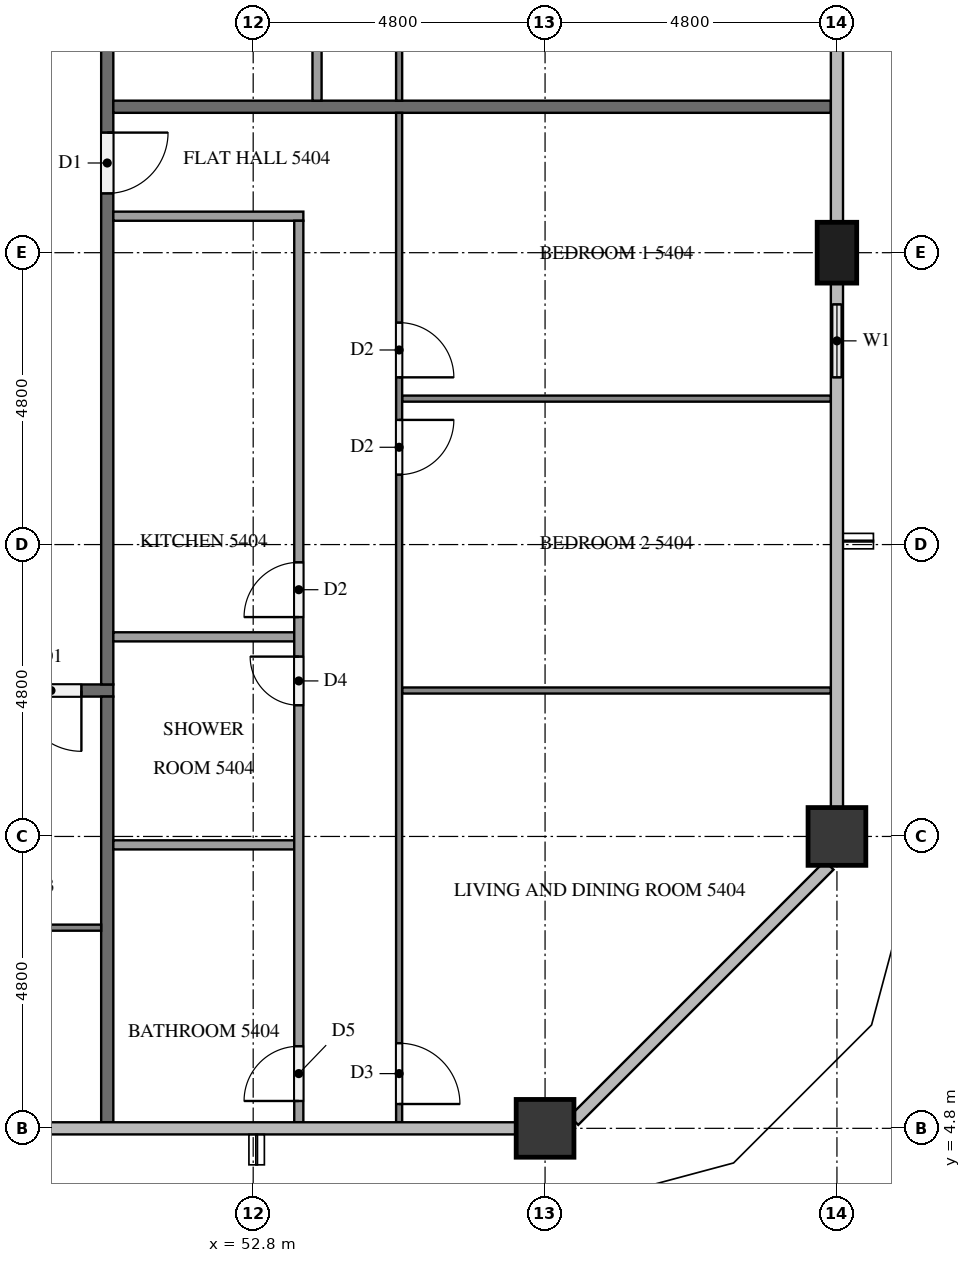
"""IFC4 building model, lengths in metres.
Left out: names, types, materials, properties, quantities, classifications, styles, units other than length and angle.
Written with IfcOpenShell. Run it as: python <this file> out.ifc"""

import sys

from ifc_helpers import new_model, si_unit, direction, frame, frame_2d, origin, origin_2d, place, context, subcontext, project, spatial, rectangle, extrude, element, fill, save


model = new_model("IFC4")
c1 = context("Model", 3, precision=1e-05, world=origin(), true_north=direction((0.0, 1.0)))
c2 = subcontext(c1, "Body", "Model", "MODEL_VIEW")
j1 = project(units=[si_unit("LENGTHUNIT", "METRE"), si_unit("PLANEANGLEUNIT", "RADIAN")], contexts=[c1])
p1 = place(None, origin())
s1 = spatial("IfcSite", under=j1, at=p1, CompositionType="ELEMENT")
p2 = place(p1, origin())
s2 = spatial("IfcBuilding", under=s1, at=p2, CompositionType="ELEMENT")
p3 = place(p2, frame((0.0, 0.0, 208.8)))
s3 = spatial("IfcBuildingStorey", under=s2, at=p3, CompositionType="ELEMENT", Elevation=208.8)
for number, where, z_axis, x_axis in (
    (1, (57.6, 4.8, 0.0), (0.0, 0.0, 1.0), (1.0, 0.0, 0.0)),
    (2, (62.4, 9.6, 0.0), (0.0, 0.0, 1.0), (1.0, 0.0, 0.0)),
):
    element("IfcColumn", number, at=place(p3, frame(where, z_axis=z_axis, x_axis=x_axis)), inside=s3, PredefinedType="COLUMN", context=c2, shape_type="SweptSolid", body=[
        extrude(rectangle(XDim=0.95, YDim=0.95, at=origin_2d()), origin(), (0.0, 0.0, 1.0), 3.2),
    ])
p4 = place(p3, frame((62.4, 19.2, 0.0), z_axis=(0.0, 0.0, 1.0), x_axis=(0.0, 1.0, 0.0)))
e3 = element("IfcColumn", 3, at=p4, inside=s3, PredefinedType="COLUMN", context=c2, shape_type="SweptSolid", body=[
    extrude(rectangle(XDim=1.0, YDim=0.65, at=origin_2d()), origin(), (0.0, 0.0, 1.0), 3.2),
])
p5 = place(p3, frame((62.4, 16.8, 0.0), z_axis=(0.0, 0.0, 1.0), x_axis=(0.0, 1.0, 0.0)))
e4 = element("IfcWall", 4, at=p5, inside=s3, PredefinedType="SOLIDWALL", context=c2, shape_type="SweptSolid", body=[
    extrude(rectangle(XDim=1.9, YDim=0.15, at=frame_2d((0.95, 0.0))), origin(), (0.0, 0.0, 1.0), 3.2),
])
p6 = place(p5, frame((0.35, 0.0, 0.9)))
e5 = element("IfcOpeningElement", 5, at=p6, cuts=e4, PredefinedType="OPENING", context=c2, shape_type="SweptSolid", body=[
    extrude(rectangle(XDim=1.2, YDim=1.4, at=frame_2d((0.6, 0.7))), frame((0.0, 0.085, 0.0), z_axis=(0.0, -1.0, 0.0), x_axis=(1.0, 0.0, 0.0)), (0.0, 0.0, 1.0), 0.17),
])
p7 = place(p3, frame((50.5, 12.0, 0.0), z_axis=(0.0, 0.0, 1.0), x_axis=(-1.0, 0.0, 0.0)))
e6 = element("IfcWall", 6, at=p7, inside=s3, PredefinedType="PARTITIONING", context=c2, shape_type="SweptSolid", body=[
    extrude(rectangle(XDim=38.6, YDim=0.2, at=frame_2d((19.3, 0.0))), origin(), (0.0, 0.0, 1.0), 3.2),
])
p8 = place(p7, frame((37.075, 0.0, 0.0)))
e7 = element("IfcOpeningElement", 7, at=p8, cuts=e6, PredefinedType="OPENING", context=c2, shape_type="SweptSolid", body=[
    extrude(rectangle(XDim=1.0, YDim=2.1, at=frame_2d((0.5, 1.05))), frame((0.0, 0.11, 0.0), z_axis=(0.0, -1.0, 0.0), x_axis=(1.0, 0.0, 0.0)), (0.0, 0.0, 1.0), 0.22),
])
p9 = place(p7, frame((20.275, 0.0, 0.0)))
e8 = element("IfcOpeningElement", 8, at=p9, cuts=e6, PredefinedType="OPENING", context=c2, shape_type="SweptSolid", body=[
    extrude(rectangle(XDim=1.0, YDim=2.1, at=frame_2d((0.5, 1.05))), frame((0.0, 0.11, 0.0), z_axis=(0.0, -1.0, 0.0), x_axis=(1.0, 0.0, 0.0)), (0.0, 0.0, 1.0), 0.22),
])
p10 = place(p7, frame((0.525, 0.0, 0.0)))
e9 = element("IfcOpeningElement", 9, at=p10, cuts=e6, PredefinedType="OPENING", context=c2, shape_type="SweptSolid", body=[
    extrude(rectangle(XDim=1.0, YDim=2.1, at=frame_2d((0.5, 1.05))), frame((0.0, 0.11, 0.0), z_axis=(0.0, -1.0, 0.0), x_axis=(1.0, 0.0, 0.0)), (0.0, 0.0, 1.0), 0.22),
])
p11 = place(p3, frame((50.4, 40.7, 0.0), z_axis=(0.0, 0.0, 1.0), x_axis=(0.0, -1.0, 0.0)))
e10 = element("IfcWall", 10, at=p11, inside=s3, PredefinedType="PARTITIONING", context=c2, shape_type="SweptSolid", body=[
    extrude(rectangle(XDim=28.6, YDim=0.2, at=frame_2d((14.3, 0.0))), origin(), (0.0, 0.0, 1.0), 3.2),
])
p12 = place(p11, frame((19.525, 0.0, 0.0)))
e11 = element("IfcOpeningElement", 11, at=p12, cuts=e10, PredefinedType="OPENING", context=c2, shape_type="SweptSolid", body=[
    extrude(rectangle(XDim=1.0, YDim=2.1, at=frame_2d((0.5, 1.05))), frame((0.0, 0.11, 0.0), z_axis=(0.0, -1.0, 0.0), x_axis=(1.0, 0.0, 0.0)), (0.0, 0.0, 1.0), 0.22),
])
p13 = place(p11, frame((7.525, 0.0, 0.0)))
e12 = element("IfcOpeningElement", 12, at=p13, cuts=e10, PredefinedType="OPENING", context=c2, shape_type="SweptSolid", body=[
    extrude(rectangle(XDim=1.0, YDim=2.1, at=frame_2d((0.5, 1.05))), frame((0.0, 0.11, 0.0), z_axis=(0.0, -1.0, 0.0), x_axis=(1.0, 0.0, 0.0)), (0.0, 0.0, 1.0), 0.22),
])
p14 = place(p11, frame((0.325, 0.0, 0.0)))
e13 = element("IfcOpeningElement", 13, at=p14, cuts=e10, PredefinedType="OPENING", context=c2, shape_type="SweptSolid", body=[
    extrude(rectangle(XDim=1.0, YDim=2.1, at=frame_2d((0.5, 1.05))), frame((0.0, 0.11, 0.0), z_axis=(0.0, -1.0, 0.0), x_axis=(1.0, 0.0, 0.0)), (0.0, 0.0, 1.0), 0.22),
])
p15 = place(p3, frame((50.4, 11.9, 0.0), z_axis=(0.0, 0.0, 1.0), x_axis=(0.0, -1.0, 0.0)))
e14 = element("IfcWall", 14, at=p15, inside=s3, PredefinedType="PARTITIONING", context=c2, shape_type="SweptSolid", body=[
    extrude(rectangle(XDim=7.0, YDim=0.2, at=frame_2d((3.5, 0.0))), origin(), (0.0, 0.0, 1.0), 3.2),
])
p16 = place(p3, frame((50.5, 21.6, 0.0), z_axis=(0.0, 0.0, 1.0), x_axis=(1.0, 0.0, 0.0)))
e15 = element("IfcWall", 15, at=p16, inside=s3, PredefinedType="PARTITIONING", context=c2, shape_type="SweptSolid", body=[
    extrude(rectangle(XDim=11.8, YDim=0.2, at=frame_2d((5.9, 0.0))), origin(), (0.0, 0.0, 1.0), 3.2),
])
p17 = place(p3, frame((50.3, 8.1, 0.0), z_axis=(0.0, 0.0, 1.0), x_axis=(-1.0, 0.0, 0.0)))
e16 = element("IfcWall", 16, at=p17, inside=s3, PredefinedType="PARTITIONING", context=c2, shape_type="SweptSolid", body=[
    extrude(rectangle(XDim=9.4, YDim=0.1, at=frame_2d((4.7, 0.0))), origin(), (0.0, 0.0, 1.0), 3.2),
])
p18 = place(p17, frame((3.35, 0.0, 0.0)))
e17 = element("IfcOpeningElement", 17, at=p18, cuts=e16, PredefinedType="OPENING", context=c2, shape_type="SweptSolid", body=[
    extrude(rectangle(XDim=1.0, YDim=2.1, at=frame_2d((0.5, 1.05))), frame((0.0, 0.06, 0.0), z_axis=(0.0, -1.0, 0.0), x_axis=(1.0, 0.0, 0.0)), (0.0, 0.0, 1.0), 0.12),
])
p19 = place(p17, frame((5.05, 0.0, 0.0)))
e18 = element("IfcOpeningElement", 18, at=p19, cuts=e16, PredefinedType="OPENING", context=c2, shape_type="SweptSolid", body=[
    extrude(rectangle(XDim=0.9, YDim=2.1, at=frame_2d((0.45, 1.05))), frame((0.0, 0.06, 0.0), z_axis=(0.0, -1.0, 0.0), x_axis=(1.0, 0.0, 0.0)), (0.0, 0.0, 1.0), 0.12),
])
for number, where, z_axis, x_axis in (
    (19, (55.25, 16.8, 0.0), (0.0, 0.0, 1.0), (1.0, 0.0, 0.0)),
    (20, (55.25, 12.0, 0.0), (0.0, 0.0, 1.0), (1.0, 0.0, 0.0)),
):
    element("IfcWall", number, at=place(p3, frame(where, z_axis=z_axis, x_axis=x_axis)), inside=s3, PredefinedType="PARTITIONING", context=c2, shape_type="SweptSolid", body=[
        extrude(rectangle(XDim=7.05, YDim=0.1, at=frame_2d((3.525, 0.0))), origin(), (0.0, 0.0, 1.0), 3.2),
    ])
p20 = place(p3, frame((55.2, 21.5, 0.0), z_axis=(0.0, 0.0, 1.0), x_axis=(0.0, -1.0, 0.0)))
e21 = element("IfcWall", 21, at=p20, inside=s3, PredefinedType="PARTITIONING", context=c2, shape_type="SweptSolid", body=[
    extrude(rectangle(XDim=16.6, YDim=0.1, at=frame_2d((8.3, 0.0))), origin(), (0.0, 0.0, 1.0), 3.2),
])
p21 = place(p20, frame((3.45, 0.0, 0.0)))
e22 = element("IfcOpeningElement", 22, at=p21, cuts=e21, PredefinedType="OPENING", context=c2, shape_type="SweptSolid", body=[
    extrude(rectangle(XDim=0.9, YDim=2.1, at=frame_2d((0.45, 1.05))), frame((0.0, 0.06, 0.0), z_axis=(0.0, -1.0, 0.0), x_axis=(1.0, 0.0, 0.0)), (0.0, 0.0, 1.0), 0.12),
])
p22 = place(p20, frame((5.05, 0.0, 0.0)))
e23 = element("IfcOpeningElement", 23, at=p22, cuts=e21, PredefinedType="OPENING", context=c2, shape_type="SweptSolid", body=[
    extrude(rectangle(XDim=0.9, YDim=2.1, at=frame_2d((0.45, 1.05))), frame((0.0, 0.06, 0.0), z_axis=(0.0, -1.0, 0.0), x_axis=(1.0, 0.0, 0.0)), (0.0, 0.0, 1.0), 0.12),
])
p23 = place(p20, frame((15.3, 0.0, 0.0)))
e24 = element("IfcOpeningElement", 24, at=p23, cuts=e21, PredefinedType="OPENING", context=c2, shape_type="SweptSolid", body=[
    extrude(rectangle(XDim=1.0, YDim=2.1, at=frame_2d((0.5, 1.05))), frame((0.0, 0.06, 0.0), z_axis=(0.0, -1.0, 0.0), x_axis=(1.0, 0.0, 0.0)), (0.0, 0.0, 1.0), 0.12),
])
for number, where, z_axis, x_axis in (
    (25, (50.5, 12.883, 0.0), (0.0, 0.0, 1.0), (1.0, 0.0, 0.0)),
    (26, (50.5, 9.461, 0.0), (0.0, 0.0, 1.0), (1.0, 0.0, 0.0)),
):
    element("IfcWall", number, at=place(p3, frame(where, z_axis=z_axis, x_axis=x_axis)), inside=s3, PredefinedType="PARTITIONING", context=c2, shape_type="SweptSolid", body=[
        extrude(rectangle(XDim=2.975, YDim=0.15, at=frame_2d((1.488, 0.0))), origin(), (0.0, 0.0, 1.0), 3.2),
    ])
p24 = place(p3, frame((50.5, 19.8, 0.0), z_axis=(0.0, 0.0, 1.0), x_axis=(1.0, 0.0, 0.0)))
e27 = element("IfcWall", 27, at=p24, inside=s3, PredefinedType="PARTITIONING", context=c2, shape_type="SweptSolid", body=[
    extrude(rectangle(XDim=3.125, YDim=0.15, at=frame_2d((1.562, 0.0))), origin(), (0.0, 0.0, 1.0), 3.2),
])
p25 = place(p3, frame((53.55, 4.9, 0.0), z_axis=(0.0, 0.0, 1.0), x_axis=(0.0, 1.0, 0.0)))
e28 = element("IfcWall", 28, at=p25, inside=s3, PredefinedType="PARTITIONING", context=c2, shape_type="SweptSolid", body=[
    extrude(rectangle(XDim=14.825, YDim=0.15, at=frame_2d((7.413, 0.0))), origin(), (0.0, 0.0, 1.0), 3.2),
])
p26 = place(p25, frame((8.308, 0.0, 0.0)))
e29 = element("IfcOpeningElement", 29, at=p26, cuts=e28, PredefinedType="OPENING", context=c2, shape_type="SweptSolid", body=[
    extrude(rectangle(XDim=0.9, YDim=2.1, at=frame_2d((0.45, 1.05))), frame((0.0, 0.085, 0.0), z_axis=(0.0, -1.0, 0.0), x_axis=(1.0, 0.0, 0.0)), (0.0, 0.0, 1.0), 0.17),
])
p27 = place(p25, frame((6.858, 0.0, 0.0)))
e30 = element("IfcOpeningElement", 30, at=p27, cuts=e28, PredefinedType="OPENING", context=c2, shape_type="SweptSolid", body=[
    extrude(rectangle(XDim=0.8, YDim=2.1, at=frame_2d((0.4, 1.05))), frame((0.0, 0.085, 0.0), z_axis=(0.0, -1.0, 0.0), x_axis=(1.0, 0.0, 0.0)), (0.0, 0.0, 1.0), 0.17),
])
p28 = place(p25, frame((0.35, 0.0, 0.0)))
e31 = element("IfcOpeningElement", 31, at=p28, cuts=e28, PredefinedType="OPENING", context=c2, shape_type="SweptSolid", body=[
    extrude(rectangle(XDim=0.9, YDim=2.1, at=frame_2d((0.45, 1.05))), frame((0.0, 0.085, 0.0), z_axis=(0.0, -1.0, 0.0), x_axis=(1.0, 0.0, 0.0)), (0.0, 0.0, 1.0), 0.17),
])
p29 = place(p3, frame((55.2, 33.5, 0.0), z_axis=(0.0, 0.0, 1.0), x_axis=(0.0, -1.0, 0.0)))
e32 = element("IfcWall", 32, at=p29, inside=s3, PredefinedType="PARTITIONING", context=c2, shape_type="SweptSolid", body=[
    extrude(rectangle(XDim=11.8, YDim=0.1, at=frame_2d((5.9, 0.0))), origin(), (0.0, 0.0, 1.0), 3.2),
])
p30 = place(p29, frame((5.75, 0.0, 0.0)))
e33 = element("IfcOpeningElement", 33, at=p30, cuts=e32, PredefinedType="OPENING", context=c2, shape_type="SweptSolid", body=[
    extrude(rectangle(XDim=1.0, YDim=2.1, at=frame_2d((0.5, 1.05))), frame((0.0, 0.06, 0.0), z_axis=(0.0, -1.0, 0.0), x_axis=(1.0, 0.0, 0.0)), (0.0, 0.0, 1.0), 0.12),
])
p31 = place(p29, frame((7.45, 0.0, 0.0)))
e34 = element("IfcOpeningElement", 34, at=p31, cuts=e32, PredefinedType="OPENING", context=c2, shape_type="SweptSolid", body=[
    extrude(rectangle(XDim=0.9, YDim=2.1, at=frame_2d((0.45, 1.05))), frame((0.0, 0.06, 0.0), z_axis=(0.0, -1.0, 0.0), x_axis=(1.0, 0.0, 0.0)), (0.0, 0.0, 1.0), 0.12),
])
p32 = place(p3, frame((53.85, 21.7, 0.0), z_axis=(0.0, 0.0, 1.0), x_axis=(0.0, 1.0, 0.0)))
e35 = element("IfcWall", 35, at=p32, inside=s3, PredefinedType="PARTITIONING", context=c2, shape_type="SweptSolid", body=[
    extrude(rectangle(XDim=10.025, YDim=0.15, at=frame_2d((5.013, 0.0))), origin(), (0.0, 0.0, 1.0), 3.2),
])
p33 = place(p32, frame((4.335, 0.0, 0.0)))
e36 = element("IfcOpeningElement", 36, at=p33, cuts=e35, PredefinedType="OPENING", context=c2, shape_type="SweptSolid", body=[
    extrude(rectangle(XDim=0.9, YDim=2.1, at=frame_2d((0.45, 1.05))), frame((0.0, 0.085, 0.0), z_axis=(0.0, -1.0, 0.0), x_axis=(1.0, 0.0, 0.0)), (0.0, 0.0, 1.0), 0.17),
])
p34 = place(p32, frame((2.885, 0.0, 0.0)))
e37 = element("IfcOpeningElement", 37, at=p34, cuts=e35, PredefinedType="OPENING", context=c2, shape_type="SweptSolid", body=[
    extrude(rectangle(XDim=0.8, YDim=2.1, at=frame_2d((0.4, 1.05))), frame((0.0, 0.085, 0.0), z_axis=(0.0, -1.0, 0.0), x_axis=(1.0, 0.0, 0.0)), (0.0, 0.0, 1.0), 0.17),
])
p35 = place(p6, origin())
e38 = element("IfcWindow", 38, at=p35, inside=s3, PartitioningType="SINGLE_PANEL", PredefinedType="WINDOW", context=c2, shape_type="SweptSolid", body=[
    extrude(rectangle(XDim=1.2, YDim=1.4, at=frame_2d((0.6, 0.7))), frame((0.0, 0.03, 0.0), z_axis=(0.0, -1.0, 0.0), x_axis=(1.0, 0.0, 0.0)), (0.0, 0.0, 1.0), 0.06),
])
fill(e5, e38)
p36 = place(p10, origin())
e39 = element("IfcDoor", 39, at=p36, inside=s3, OperationType="SINGLE_SWING_LEFT", PredefinedType="DOOR", context=c2, shape_type="SweptSolid", body=[
    extrude(rectangle(XDim=1.0, YDim=2.1, at=frame_2d((0.5, 1.05))), frame((0.0, 0.025, 0.0), z_axis=(0.0, -1.0, 0.0), x_axis=(1.0, 0.0, 0.0)), (0.0, 0.0, 1.0), 0.05),
])
fill(e9, e39)
p37 = place(p12, origin())
e40 = element("IfcDoor", 40, at=p37, inside=s3, OperationType="SINGLE_SWING_LEFT", PredefinedType="DOOR", context=c2, shape_type="SweptSolid", body=[
    extrude(rectangle(XDim=1.0, YDim=2.1, at=frame_2d((0.5, 1.05))), frame((0.0, 0.025, 0.0), z_axis=(0.0, -1.0, 0.0), x_axis=(1.0, 0.0, 0.0)), (0.0, 0.0, 1.0), 0.05),
])
fill(e11, e40)
p38 = place(p21, origin())
e41 = element("IfcDoor", 41, at=p38, inside=s3, OperationType="SINGLE_SWING_RIGHT", PredefinedType="DOOR", context=c2, shape_type="SweptSolid", body=[
    extrude(rectangle(XDim=0.9, YDim=2.1, at=frame_2d((0.45, 1.05))), frame((0.0, 0.025, 0.0), z_axis=(0.0, -1.0, 0.0), x_axis=(1.0, 0.0, 0.0)), (0.0, 0.0, 1.0), 0.05),
])
fill(e22, e41)
p39 = place(p22, origin())
e42 = element("IfcDoor", 42, at=p39, inside=s3, OperationType="SINGLE_SWING_LEFT", PredefinedType="DOOR", context=c2, shape_type="SweptSolid", body=[
    extrude(rectangle(XDim=0.9, YDim=2.1, at=frame_2d((0.45, 1.05))), frame((0.0, 0.025, 0.0), z_axis=(0.0, -1.0, 0.0), x_axis=(1.0, 0.0, 0.0)), (0.0, 0.0, 1.0), 0.05),
])
fill(e23, e42)
p40 = place(p23, origin())
e43 = element("IfcDoor", 43, at=p40, inside=s3, OperationType="SINGLE_SWING_RIGHT", PredefinedType="DOOR", context=c2, shape_type="SweptSolid", body=[
    extrude(rectangle(XDim=1.0, YDim=2.1, at=frame_2d((0.5, 1.05))), frame((0.0, 0.025, 0.0), z_axis=(0.0, -1.0, 0.0), x_axis=(1.0, 0.0, 0.0)), (0.0, 0.0, 1.0), 0.05),
])
fill(e24, e43)
p41 = place(p26, origin())
e44 = element("IfcDoor", 44, at=p41, inside=s3, OperationType="SINGLE_SWING_LEFT", PredefinedType="DOOR", context=c2, shape_type="SweptSolid", body=[
    extrude(rectangle(XDim=0.9, YDim=2.1, at=frame_2d((0.45, 1.05))), frame((0.0, 0.025, 0.0), z_axis=(0.0, -1.0, 0.0), x_axis=(1.0, 0.0, 0.0)), (0.0, 0.0, 1.0), 0.05),
])
fill(e29, e44)
p42 = place(p27, origin())
e45 = element("IfcDoor", 45, at=p42, inside=s3, OperationType="SINGLE_SWING_RIGHT", PredefinedType="DOOR", context=c2, shape_type="SweptSolid", body=[
    extrude(rectangle(XDim=0.8, YDim=2.1, at=frame_2d((0.4, 1.05))), frame((0.0, 0.025, 0.0), z_axis=(0.0, -1.0, 0.0), x_axis=(1.0, 0.0, 0.0)), (0.0, 0.0, 1.0), 0.05),
])
fill(e30, e45)
p43 = place(p28, origin())
e46 = element("IfcDoor", 46, at=p43, inside=s3, OperationType="SINGLE_SWING_LEFT", PredefinedType="DOOR", context=c2, shape_type="SweptSolid", body=[
    extrude(rectangle(XDim=0.9, YDim=2.1, at=frame_2d((0.45, 1.05))), frame((0.0, 0.025, 0.0), z_axis=(0.0, -1.0, 0.0), x_axis=(1.0, 0.0, 0.0)), (0.0, 0.0, 1.0), 0.05),
])
fill(e31, e46)
save(model, sys.argv[1])
